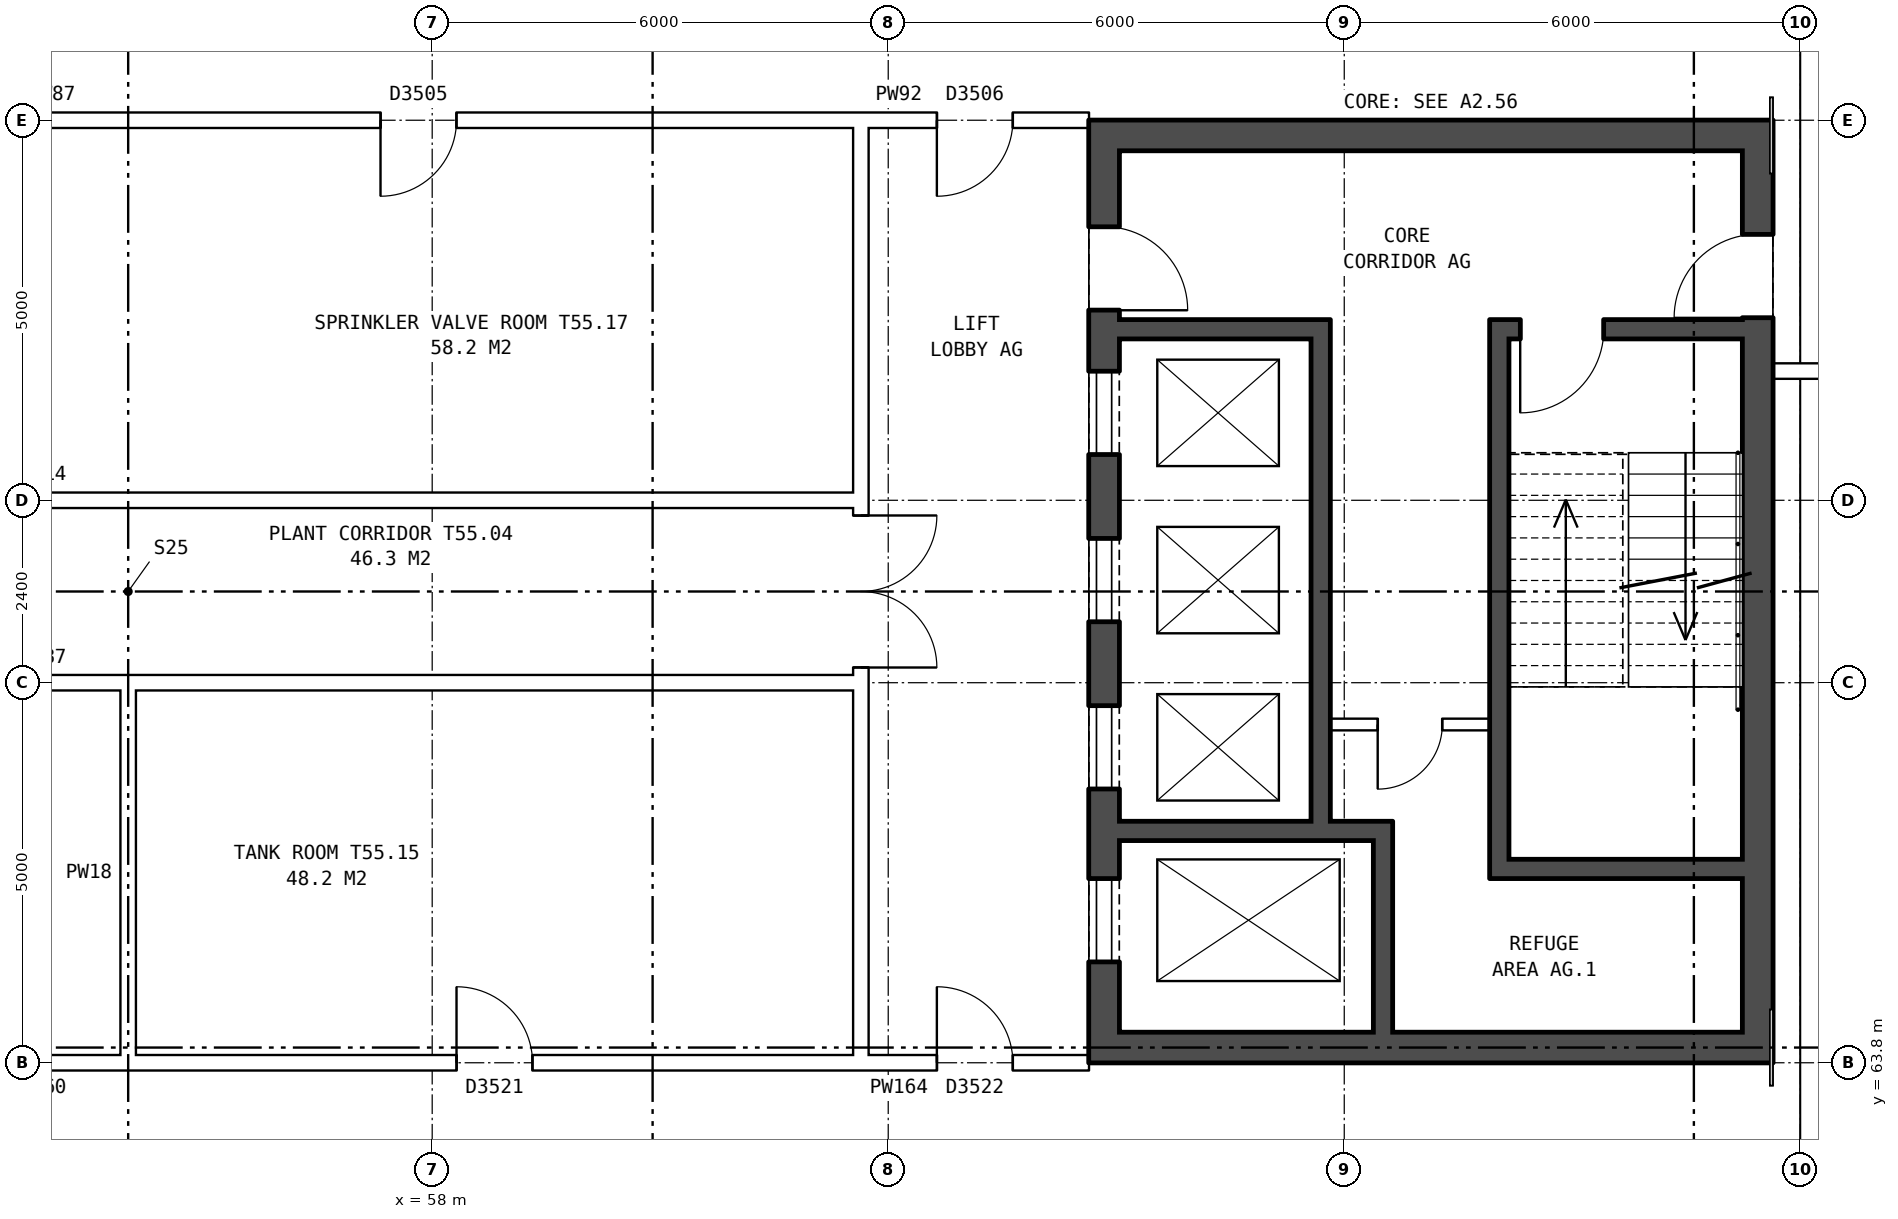
"""IFC4 building model, lengths in metres.
Left out: names, types, materials, properties, quantities, classifications, styles, units other than length and angle.
Written with IfcOpenShell. Run it as: python <this file> out.ifc"""

import sys

from ifc_helpers import new_model, si_unit, direction, frame, frame_2d, origin, place, context, subcontext, project, spatial, rectangle, extrude, element, fill, save


model = new_model("IFC4")
c1 = context("Model", 3, precision=1e-05, world=origin(), true_north=direction((0.0, 1.0)))
c2 = subcontext(c1, "Body", "Model", "MODEL_VIEW")
j1 = project(units=[si_unit("LENGTHUNIT", "METRE"), si_unit("PLANEANGLEUNIT", "RADIAN")], contexts=[c1])
p1 = place(None, origin())
s1 = spatial("IfcSite", under=j1, at=p1, CompositionType="ELEMENT")
p2 = place(p1, origin())
s2 = spatial("IfcBuilding", under=s1, at=p2, CompositionType="ELEMENT")
p3 = place(p2, frame((0.0, 0.0, 194.4)))
s3 = spatial("IfcBuildingStorey", under=s2, at=p3, CompositionType="ELEMENT", Elevation=194.4)
p4 = place(p3, frame((66.84, 63.8, 0.0), z_axis=(0.0, 0.0, 1.0), x_axis=(0.0, 1.0, 0.0)))
e1 = element("IfcWall", 1, at=p4, inside=s3, PredefinedType="SHEAR", context=c2, shape_type="SweptSolid", body=[
    extrude(rectangle(XDim=12.4, YDim=0.4, at=frame_2d((6.2, 0.0))), origin(), (0.0, 0.0, 1.0), 3.95),
])
p5 = place(p4, frame((1.325, 0.0, 0.0)))
e2 = element("IfcOpeningElement", 2, at=p5, cuts=e1, PredefinedType="OPENING", context=c2, shape_type="SweptSolid", body=[
    extrude(rectangle(XDim=1.1, YDim=2.1, at=frame_2d((0.55, 1.05))), frame((0.0, 0.21, 0.0), z_axis=(0.0, -1.0, 0.0), x_axis=(1.0, 0.0, 0.0)), (0.0, 0.0, 1.0), 0.42),
])
p6 = place(p4, frame((3.6, 0.0, 0.0)))
e3 = element("IfcOpeningElement", 3, at=p6, cuts=e1, PredefinedType="OPENING", context=c2, shape_type="SweptSolid", body=[
    extrude(rectangle(XDim=1.1, YDim=2.1, at=frame_2d((0.55, 1.05))), frame((0.0, 0.21, 0.0), z_axis=(0.0, -1.0, 0.0), x_axis=(1.0, 0.0, 0.0)), (0.0, 0.0, 1.0), 0.42),
])
p7 = place(p4, frame((5.8, 0.0, 0.0)))
e4 = element("IfcOpeningElement", 4, at=p7, cuts=e1, PredefinedType="OPENING", context=c2, shape_type="SweptSolid", body=[
    extrude(rectangle(XDim=1.1, YDim=2.1, at=frame_2d((0.55, 1.05))), frame((0.0, 0.21, 0.0), z_axis=(0.0, -1.0, 0.0), x_axis=(1.0, 0.0, 0.0)), (0.0, 0.0, 1.0), 0.42),
])
p8 = place(p4, frame((8.0, 0.0, 0.0)))
e5 = element("IfcOpeningElement", 5, at=p8, cuts=e1, PredefinedType="OPENING", context=c2, shape_type="SweptSolid", body=[
    extrude(rectangle(XDim=1.1, YDim=2.1, at=frame_2d((0.55, 1.05))), frame((0.0, 0.21, 0.0), z_axis=(0.0, -1.0, 0.0), x_axis=(1.0, 0.0, 0.0)), (0.0, 0.0, 1.0), 0.42),
])
p9 = place(p4, frame((9.9, 0.0, 0.0)))
e6 = element("IfcOpeningElement", 6, at=p9, cuts=e1, PredefinedType="OPENING", context=c2, shape_type="SweptSolid", body=[
    extrude(rectangle(XDim=1.1, YDim=2.1, at=frame_2d((0.55, 1.05))), frame((0.0, 0.21, 0.0), z_axis=(0.0, -1.0, 0.0), x_axis=(1.0, 0.0, 0.0)), (0.0, 0.0, 1.0), 0.42),
])
p10 = place(p3, frame((75.44, 63.8, 0.0), z_axis=(0.0, 0.0, 1.0), x_axis=(0.0, 1.0, 0.0)))
e7 = element("IfcWall", 7, at=p10, inside=s3, PredefinedType="SHEAR", context=c2, shape_type="SweptSolid", body=[
    extrude(rectangle(XDim=12.4, YDim=0.4, at=frame_2d((6.2, 0.0))), origin(), (0.0, 0.0, 1.0), 3.95),
])
p11 = place(p10, frame((9.8, 0.0, 0.0)))
e8 = element("IfcOpeningElement", 8, at=p11, cuts=e7, PredefinedType="OPENING", context=c2, shape_type="SweptSolid", body=[
    extrude(rectangle(XDim=1.1, YDim=2.1, at=frame_2d((0.55, 1.05))), frame((0.0, 0.21, 0.0), z_axis=(0.0, -1.0, 0.0), x_axis=(1.0, 0.0, 0.0)), (0.0, 0.0, 1.0), 0.42),
])
for number, where, z_axis, x_axis in (
    (9, (67.04, 64.0, 0.0), (0.0, 0.0, 1.0), (1.0, 0.0, 0.0)),
    (10, (67.04, 76.0, 0.0), (0.0, 0.0, 1.0), (1.0, 0.0, 0.0)),
):
    element("IfcWall", number, at=place(p3, frame(where, z_axis=z_axis, x_axis=x_axis)), inside=s3, PredefinedType="SHEAR", context=c2, shape_type="SweptSolid", body=[
        extrude(rectangle(XDim=8.2, YDim=0.4, at=frame_2d((4.1, 0.0))), origin(), (0.0, 0.0, 1.0), 3.95),
    ])
p12 = place(p3, frame((72.165, 66.35, 0.0), z_axis=(0.0, 0.0, 1.0), x_axis=(1.0, 0.0, 0.0)))
e11 = element("IfcWall", 11, at=p12, inside=s3, PredefinedType="SHEAR", context=c2, shape_type="SweptSolid", body=[
    extrude(rectangle(XDim=3.075, YDim=0.25, at=frame_2d((1.538, 0.0))), origin(), (0.0, 0.0, 1.0), 3.95),
])
p13 = place(p3, frame((67.04, 66.85, 0.0), z_axis=(0.0, 0.0, 1.0), x_axis=(1.0, 0.0, 0.0)))
e12 = element("IfcWall", 12, at=p13, inside=s3, PredefinedType="SHEAR", context=c2, shape_type="SweptSolid", body=[
    extrude(rectangle(XDim=3.595, YDim=0.25, at=frame_2d((1.797, 0.0))), origin(), (0.0, 0.0, 1.0), 3.95),
])
p14 = place(p3, frame((69.815, 68.25, 0.0), z_axis=(0.0, 0.0, 1.0), x_axis=(1.0, 0.0, 0.0)))
e13 = element("IfcWall", 13, at=p14, inside=s3, PredefinedType="PARTITIONING", context=c2, shape_type="SweptSolid", body=[
    extrude(rectangle(XDim=2.1, YDim=0.15, at=frame_2d((1.05, 0.0))), origin(), (0.0, 0.0, 1.0), 3.95),
])
p15 = place(p14, frame((0.625, 0.0, 0.0)))
e14 = element("IfcOpeningElement", 14, at=p15, cuts=e13, PredefinedType="OPENING", context=c2, shape_type="SweptSolid", body=[
    extrude(rectangle(XDim=0.85, YDim=2.1, at=frame_2d((0.425, 1.05))), frame((0.0, 0.085, 0.0), z_axis=(0.0, -1.0, 0.0), x_axis=(1.0, 0.0, 0.0)), (0.0, 0.0, 1.0), 0.17),
])
p16 = place(p3, frame((67.04, 73.45, 0.0), z_axis=(0.0, 0.0, 1.0), x_axis=(1.0, 0.0, 0.0)))
e15 = element("IfcWall", 15, at=p16, inside=s3, PredefinedType="SHEAR", context=c2, shape_type="SweptSolid", body=[
    extrude(rectangle(XDim=2.525, YDim=0.25, at=frame_2d((1.262, 0.0))), origin(), (0.0, 0.0, 1.0), 3.95),
])
p17 = place(p3, frame((72.165, 73.45, 0.0), z_axis=(0.0, 0.0, 1.0), x_axis=(1.0, 0.0, 0.0)))
e16 = element("IfcWall", 16, at=p17, inside=s3, PredefinedType="SHEAR", context=c2, shape_type="SweptSolid", body=[
    extrude(rectangle(XDim=3.075, YDim=0.25, at=frame_2d((1.538, 0.0))), origin(), (0.0, 0.0, 1.0), 3.95),
])
p18 = place(p17, frame((0.15, 0.0, 0.0)))
e17 = element("IfcOpeningElement", 17, at=p18, cuts=e16, PredefinedType="OPENING", context=c2, shape_type="SweptSolid", body=[
    extrude(rectangle(XDim=1.1, YDim=2.1, at=frame_2d((0.55, 1.05))), frame((0.0, 0.135, 0.0), z_axis=(0.0, -1.0, 0.0), x_axis=(1.0, 0.0, 0.0)), (0.0, 0.0, 1.0), 0.27),
])
p19 = place(p3, frame((69.69, 66.975, 0.0), z_axis=(0.0, 0.0, 1.0), x_axis=(0.0, 1.0, 0.0)))
e18 = element("IfcWall", 18, at=p19, inside=s3, PredefinedType="SHEAR", context=c2, shape_type="SweptSolid", body=[
    extrude(rectangle(XDim=6.6, YDim=0.25, at=frame_2d((3.3, 0.0))), origin(), (0.0, 0.0, 1.0), 3.95),
])
p20 = place(p3, frame((70.51, 64.2, 0.0), z_axis=(0.0, 0.0, 1.0), x_axis=(0.0, 1.0, 0.0)))
e19 = element("IfcWall", 19, at=p20, inside=s3, PredefinedType="SHEAR", context=c2, shape_type="SweptSolid", body=[
    extrude(rectangle(XDim=2.525, YDim=0.25, at=frame_2d((1.263, 0.0))), origin(), (0.0, 0.0, 1.0), 3.95),
])
p21 = place(p3, frame((72.04, 66.225, 0.0), z_axis=(0.0, 0.0, 1.0), x_axis=(0.0, 1.0, 0.0)))
e20 = element("IfcWall", 20, at=p21, inside=s3, PredefinedType="SHEAR", context=c2, shape_type="SweptSolid", body=[
    extrude(rectangle(XDim=7.35, YDim=0.25, at=frame_2d((3.675, 0.0))), origin(), (0.0, 0.0, 1.0), 3.95),
])
p22 = place(p3, frame((63.64, 63.9, 0.0), z_axis=(0.0, 0.0, 1.0), x_axis=(0.0, 1.0, 0.0)))
e21 = element("IfcWall", 21, at=p22, inside=s3, PredefinedType="PARTITIONING", context=c2, shape_type="SweptSolid", body=[
    extrude(rectangle(XDim=12.2, YDim=0.2, at=frame_2d((6.1, 0.0))), origin(), (0.0, 0.0, 1.0), 3.95),
])
p23 = place(p22, frame((5.1, 0.0, 0.0)))
e22 = element("IfcOpeningElement", 22, at=p23, cuts=e21, PredefinedType="OPENING", context=c2, shape_type="SweptSolid", body=[
    extrude(rectangle(XDim=2.0, YDim=2.1, at=frame_2d((1.0, 1.05))), frame((0.0, 0.11, 0.0), z_axis=(0.0, -1.0, 0.0), x_axis=(1.0, 0.0, 0.0)), (0.0, 0.0, 1.0), 0.22),
])
p24 = place(p3, frame((44.36, 63.8, 0.0), z_axis=(0.0, 0.0, 1.0), x_axis=(1.0, 0.0, 0.0)))
e23 = element("IfcWall", 23, at=p24, inside=s3, PredefinedType="PARTITIONING", context=c2, shape_type="SweptSolid", body=[
    extrude(rectangle(XDim=19.28, YDim=0.2, at=frame_2d((9.64, 0.0))), origin(), (0.0, 0.0, 1.0), 3.95),
])
p25 = place(p24, frame((4.32, 0.0, 0.0)))
e24 = element("IfcOpeningElement", 24, at=p25, cuts=e23, PredefinedType="OPENING", context=c2, shape_type="SweptSolid", body=[
    extrude(rectangle(XDim=1.0, YDim=2.1, at=frame_2d((0.5, 1.05))), frame((0.0, 0.11, 0.0), z_axis=(0.0, -1.0, 0.0), x_axis=(1.0, 0.0, 0.0)), (0.0, 0.0, 1.0), 0.22),
])
p26 = place(p24, frame((13.96, 0.0, 0.0)))
e25 = element("IfcOpeningElement", 25, at=p26, cuts=e23, PredefinedType="OPENING", context=c2, shape_type="SweptSolid", body=[
    extrude(rectangle(XDim=1.0, YDim=2.1, at=frame_2d((0.5, 1.05))), frame((0.0, 0.11, 0.0), z_axis=(0.0, -1.0, 0.0), x_axis=(1.0, 0.0, 0.0)), (0.0, 0.0, 1.0), 0.22),
])
p27 = place(p3, frame((63.64, 63.8, 0.0), z_axis=(0.0, 0.0, 1.0), x_axis=(1.0, 0.0, 0.0)))
e26 = element("IfcWall", 26, at=p27, inside=s3, PredefinedType="PARTITIONING", context=c2, shape_type="SweptSolid", body=[
    extrude(rectangle(XDim=3.0, YDim=0.2, at=frame_2d((1.5, 0.0))), origin(), (0.0, 0.0, 1.0), 3.95),
])
p28 = place(p27, frame((1.0, 0.0, 0.0)))
e27 = element("IfcOpeningElement", 27, at=p28, cuts=e26, PredefinedType="OPENING", context=c2, shape_type="SweptSolid", body=[
    extrude(rectangle(XDim=1.0, YDim=2.1, at=frame_2d((0.5, 1.05))), frame((0.0, 0.11, 0.0), z_axis=(0.0, -1.0, 0.0), x_axis=(1.0, 0.0, 0.0)), (0.0, 0.0, 1.0), 0.22),
])
for number, where, z_axis, x_axis in (
    (28, (44.36, 68.8, 0.0), (0.0, 0.0, 1.0), (1.0, 0.0, 0.0)),
    (29, (44.36, 71.2, 0.0), (0.0, 0.0, 1.0), (1.0, 0.0, 0.0)),
):
    element("IfcWall", number, at=place(p3, frame(where, z_axis=z_axis, x_axis=x_axis)), inside=s3, PredefinedType="PARTITIONING", context=c2, shape_type="SweptSolid", body=[
        extrude(rectangle(XDim=19.28, YDim=0.2, at=frame_2d((9.64, 0.0))), origin(), (0.0, 0.0, 1.0), 3.95),
    ])
p29 = place(p3, frame((75.64, 72.9, 0.0), z_axis=(0.0, 0.0, 1.0), x_axis=(1.0, 0.0, 0.0)))
e30 = element("IfcWall", 30, at=p29, inside=s3, PredefinedType="PARTITIONING", context=c2, shape_type="SweptSolid", body=[
    extrude(rectangle(XDim=55.72, YDim=0.2, at=frame_2d((27.86, 0.0))), origin(), (0.0, 0.0, 1.0), 3.95),
])
p30 = place(p29, frame((6.555, 0.0, 0.0)))
e31 = element("IfcOpeningElement", 31, at=p30, cuts=e30, PredefinedType="OPENING", context=c2, shape_type="SweptSolid", body=[
    extrude(rectangle(XDim=1.0, YDim=2.1, at=frame_2d((0.5, 1.05))), frame((0.0, 0.11, 0.0), z_axis=(0.0, -1.0, 0.0), x_axis=(1.0, 0.0, 0.0)), (0.0, 0.0, 1.0), 0.22),
])
p31 = place(p29, frame((20.485, 0.0, 0.0)))
e32 = element("IfcOpeningElement", 32, at=p31, cuts=e30, PredefinedType="OPENING", context=c2, shape_type="SweptSolid", body=[
    extrude(rectangle(XDim=1.0, YDim=2.1, at=frame_2d((0.5, 1.05))), frame((0.0, 0.11, 0.0), z_axis=(0.0, -1.0, 0.0), x_axis=(1.0, 0.0, 0.0)), (0.0, 0.0, 1.0), 0.22),
])
p32 = place(p29, frame((34.235, 0.0, 0.0)))
e33 = element("IfcOpeningElement", 33, at=p32, cuts=e30, PredefinedType="OPENING", context=c2, shape_type="SweptSolid", body=[
    extrude(rectangle(XDim=1.0, YDim=2.1, at=frame_2d((0.5, 1.05))), frame((0.0, 0.11, 0.0), z_axis=(0.0, -1.0, 0.0), x_axis=(1.0, 0.0, 0.0)), (0.0, 0.0, 1.0), 0.22),
])
p33 = place(p29, frame((48.165, 0.0, 0.0)))
e34 = element("IfcOpeningElement", 34, at=p33, cuts=e30, PredefinedType="OPENING", context=c2, shape_type="SweptSolid", body=[
    extrude(rectangle(XDim=1.0, YDim=2.1, at=frame_2d((0.5, 1.05))), frame((0.0, 0.11, 0.0), z_axis=(0.0, -1.0, 0.0), x_axis=(1.0, 0.0, 0.0)), (0.0, 0.0, 1.0), 0.22),
])
p34 = place(p3, frame((44.36, 76.2, 0.0), z_axis=(0.0, 0.0, 1.0), x_axis=(1.0, 0.0, 0.0)))
e35 = element("IfcWall", 35, at=p34, inside=s3, PredefinedType="PARTITIONING", context=c2, shape_type="SweptSolid", body=[
    extrude(rectangle(XDim=19.28, YDim=0.2, at=frame_2d((9.64, 0.0))), origin(), (0.0, 0.0, 1.0), 3.95),
])
p35 = place(p34, frame((3.32, 0.0, 0.0)))
e36 = element("IfcOpeningElement", 36, at=p35, cuts=e35, PredefinedType="OPENING", context=c2, shape_type="SweptSolid", body=[
    extrude(rectangle(XDim=1.0, YDim=2.1, at=frame_2d((0.5, 1.05))), frame((0.0, 0.11, 0.0), z_axis=(0.0, -1.0, 0.0), x_axis=(1.0, 0.0, 0.0)), (0.0, 0.0, 1.0), 0.22),
])
p36 = place(p34, frame((12.96, 0.0, 0.0)))
e37 = element("IfcOpeningElement", 37, at=p36, cuts=e35, PredefinedType="OPENING", context=c2, shape_type="SweptSolid", body=[
    extrude(rectangle(XDim=1.0, YDim=2.1, at=frame_2d((0.5, 1.05))), frame((0.0, 0.11, 0.0), z_axis=(0.0, -1.0, 0.0), x_axis=(1.0, 0.0, 0.0)), (0.0, 0.0, 1.0), 0.22),
])
p37 = place(p3, frame((63.64, 76.2, 0.0), z_axis=(0.0, 0.0, 1.0), x_axis=(1.0, 0.0, 0.0)))
e38 = element("IfcWall", 38, at=p37, inside=s3, PredefinedType="PARTITIONING", context=c2, shape_type="SweptSolid", body=[
    extrude(rectangle(XDim=3.0, YDim=0.2, at=frame_2d((1.5, 0.0))), origin(), (0.0, 0.0, 1.0), 3.95),
])
p38 = place(p37, frame((1.0, 0.0, 0.0)))
e39 = element("IfcOpeningElement", 39, at=p38, cuts=e38, PredefinedType="OPENING", context=c2, shape_type="SweptSolid", body=[
    extrude(rectangle(XDim=1.0, YDim=2.1, at=frame_2d((0.5, 1.05))), frame((0.0, 0.11, 0.0), z_axis=(0.0, -1.0, 0.0), x_axis=(1.0, 0.0, 0.0)), (0.0, 0.0, 1.0), 0.22),
])
p39 = place(p3, frame((54.0, 63.7, 0.0), z_axis=(0.0, 0.0, 1.0), x_axis=(0.0, 1.0, 0.0)))
e40 = element("IfcWall", 40, at=p39, inside=s3, PredefinedType="PARTITIONING", context=c2, shape_type="SweptSolid", body=[
    extrude(rectangle(XDim=5.2, YDim=0.2, at=frame_2d((2.6, 0.0))), origin(), (0.0, 0.0, 1.0), 3.95),
])
p40 = place(p5, origin())
e41 = element("IfcDoor", 41, at=p40, inside=s3, OperationType="DOUBLE_DOOR_SLIDING", PredefinedType="DOOR", context=c2, shape_type="SweptSolid", body=[
    extrude(rectangle(XDim=1.1, YDim=2.1, at=frame_2d((0.55, 1.05))), frame((0.0, -0.135, 0.0), z_axis=(0.0, -1.0, 0.0), x_axis=(1.0, 0.0, 0.0)), (0.0, 0.0, 1.0), 0.05),
])
fill(e2, e41)
p41 = place(p6, origin())
e42 = element("IfcDoor", 42, at=p41, inside=s3, OperationType="DOUBLE_DOOR_SLIDING", PredefinedType="DOOR", context=c2, shape_type="SweptSolid", body=[
    extrude(rectangle(XDim=1.1, YDim=2.1, at=frame_2d((0.55, 1.05))), frame((0.0, -0.135, 0.0), z_axis=(0.0, -1.0, 0.0), x_axis=(1.0, 0.0, 0.0)), (0.0, 0.0, 1.0), 0.05),
])
fill(e3, e42)
p42 = place(p7, origin())
e43 = element("IfcDoor", 43, at=p42, inside=s3, OperationType="DOUBLE_DOOR_SLIDING", PredefinedType="DOOR", context=c2, shape_type="SweptSolid", body=[
    extrude(rectangle(XDim=1.1, YDim=2.1, at=frame_2d((0.55, 1.05))), frame((0.0, -0.135, 0.0), z_axis=(0.0, -1.0, 0.0), x_axis=(1.0, 0.0, 0.0)), (0.0, 0.0, 1.0), 0.05),
])
fill(e4, e43)
p43 = place(p8, origin())
e44 = element("IfcDoor", 44, at=p43, inside=s3, OperationType="DOUBLE_DOOR_SLIDING", PredefinedType="DOOR", context=c2, shape_type="SweptSolid", body=[
    extrude(rectangle(XDim=1.1, YDim=2.1, at=frame_2d((0.55, 1.05))), frame((0.0, -0.135, 0.0), z_axis=(0.0, -1.0, 0.0), x_axis=(1.0, 0.0, 0.0)), (0.0, 0.0, 1.0), 0.05),
])
fill(e5, e44)
p44 = place(p9, frame((1.1, 0.0, 0.0), z_axis=(0.0, 0.0, 1.0), x_axis=(-1.0, 0.0, 0.0)))
e45 = element("IfcDoor", 45, at=p44, inside=s3, OperationType="SINGLE_SWING_RIGHT", PredefinedType="DOOR", context=c2, shape_type="SweptSolid", body=[
    extrude(rectangle(XDim=1.1, YDim=2.1, at=frame_2d((0.55, 1.05))), frame((0.0, 0.185, 0.0), z_axis=(0.0, -1.0, 0.0), x_axis=(1.0, 0.0, 0.0)), (0.0, 0.0, 1.0), 0.05),
])
fill(e6, e45)
p45 = place(p18, frame((1.1, 0.0, 0.0), z_axis=(0.0, 0.0, 1.0), x_axis=(-1.0, 0.0, 0.0)))
e46 = element("IfcDoor", 46, at=p45, inside=s3, OperationType="SINGLE_SWING_RIGHT", PredefinedType="DOOR", context=c2, shape_type="SweptSolid", body=[
    extrude(rectangle(XDim=1.1, YDim=2.1, at=frame_2d((0.55, 1.05))), frame((0.0, 0.025, 0.0), z_axis=(0.0, -1.0, 0.0), x_axis=(1.0, 0.0, 0.0)), (0.0, 0.0, 1.0), 0.05),
])
fill(e17, e46)
p46 = place(p15, frame((0.85, 0.0, 0.0), z_axis=(0.0, 0.0, 1.0), x_axis=(-1.0, 0.0, 0.0)))
e47 = element("IfcDoor", 47, at=p46, inside=s3, OperationType="SINGLE_SWING_RIGHT", PredefinedType="DOOR", context=c2, shape_type="SweptSolid", body=[
    extrude(rectangle(XDim=0.85, YDim=2.1, at=frame_2d((0.425, 1.05))), frame((0.0, 0.025, 0.0), z_axis=(0.0, -1.0, 0.0), x_axis=(1.0, 0.0, 0.0)), (0.0, 0.0, 1.0), 0.05),
])
fill(e14, e47)
p47 = place(p11, origin())
e48 = element("IfcDoor", 48, at=p47, inside=s3, OperationType="SINGLE_SWING_LEFT", PredefinedType="DOOR", context=c2, shape_type="SweptSolid", body=[
    extrude(rectangle(XDim=1.1, YDim=2.1, at=frame_2d((0.55, 1.05))), frame((0.0, 0.185, 0.0), z_axis=(0.0, -1.0, 0.0), x_axis=(1.0, 0.0, 0.0)), (0.0, 0.0, 1.0), 0.05),
])
fill(e8, e48)
p48 = place(p23, frame((2.0, 0.0, 0.0), z_axis=(0.0, 0.0, 1.0), x_axis=(-1.0, 0.0, 0.0)))
e49 = element("IfcDoor", 49, at=p48, inside=s3, OperationType="DOUBLE_DOOR_SINGLE_SWING", PredefinedType="DOOR", context=c2, shape_type="SweptSolid", body=[
    extrude(rectangle(XDim=2.0, YDim=2.1, at=frame_2d((1.0, 1.05))), frame((0.0, 0.025, 0.0), z_axis=(0.0, -1.0, 0.0), x_axis=(1.0, 0.0, 0.0)), (0.0, 0.0, 1.0), 0.05),
])
fill(e22, e49)
p49 = place(p26, origin())
e50 = element("IfcDoor", 50, at=p49, inside=s3, OperationType="SINGLE_SWING_LEFT", PredefinedType="DOOR", context=c2, shape_type="SweptSolid", body=[
    extrude(rectangle(XDim=1.0, YDim=2.1, at=frame_2d((0.5, 1.05))), frame((0.0, 0.025, 0.0), z_axis=(0.0, -1.0, 0.0), x_axis=(1.0, 0.0, 0.0)), (0.0, 0.0, 1.0), 0.05),
])
fill(e25, e50)
p50 = place(p28, origin())
e51 = element("IfcDoor", 51, at=p50, inside=s3, OperationType="SINGLE_SWING_LEFT", PredefinedType="DOOR", context=c2, shape_type="SweptSolid", body=[
    extrude(rectangle(XDim=1.0, YDim=2.1, at=frame_2d((0.5, 1.05))), frame((0.0, 0.025, 0.0), z_axis=(0.0, -1.0, 0.0), x_axis=(1.0, 0.0, 0.0)), (0.0, 0.0, 1.0), 0.05),
])
fill(e27, e51)
p51 = place(p36, frame((1.0, 0.0, 0.0), z_axis=(0.0, 0.0, 1.0), x_axis=(-1.0, 0.0, 0.0)))
e52 = element("IfcDoor", 52, at=p51, inside=s3, OperationType="SINGLE_SWING_RIGHT", PredefinedType="DOOR", context=c2, shape_type="SweptSolid", body=[
    extrude(rectangle(XDim=1.0, YDim=2.1, at=frame_2d((0.5, 1.05))), frame((0.0, 0.025, 0.0), z_axis=(0.0, -1.0, 0.0), x_axis=(1.0, 0.0, 0.0)), (0.0, 0.0, 1.0), 0.05),
])
fill(e37, e52)
p52 = place(p38, frame((1.0, 0.0, 0.0), z_axis=(0.0, 0.0, 1.0), x_axis=(-1.0, 0.0, 0.0)))
e53 = element("IfcDoor", 53, at=p52, inside=s3, OperationType="SINGLE_SWING_RIGHT", PredefinedType="DOOR", context=c2, shape_type="SweptSolid", body=[
    extrude(rectangle(XDim=1.0, YDim=2.1, at=frame_2d((0.5, 1.05))), frame((0.0, 0.025, 0.0), z_axis=(0.0, -1.0, 0.0), x_axis=(1.0, 0.0, 0.0)), (0.0, 0.0, 1.0), 0.05),
])
fill(e39, e53)
save(model, sys.argv[1])
